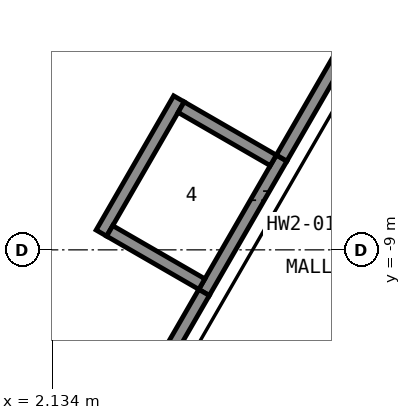
"""IFC4 building model, lengths in metres.
Left out: names, types, materials, properties, quantities, classifications, styles, units other than length and angle.
Written with IfcOpenShell. Run it as: python <this file> out.ifc"""

import sys

from ifc_helpers import new_model, si_unit, direction, frame, frame_2d, origin, place, context, subcontext, project, spatial, rectangle, extrude, element, save


model = new_model("IFC4")
c1 = context("Model", 3, precision=1e-05, world=origin(), true_north=direction((0.0, 1.0)))
c2 = subcontext(c1, "Body", "Model", "MODEL_VIEW")
j1 = project(units=[si_unit("LENGTHUNIT", "METRE"), si_unit("PLANEANGLEUNIT", "RADIAN")], contexts=[c1])
p1 = place(None, origin())
s1 = spatial("IfcSite", under=j1, at=p1, CompositionType="ELEMENT")
p2 = place(p1, origin())
s2 = spatial("IfcBuilding", under=s1, at=p2, CompositionType="ELEMENT")
p3 = place(p2, frame((0.0, 0.0, 32.0)))
s3 = spatial("IfcBuildingStorey", under=s2, at=p3, CompositionType="ELEMENT", Elevation=32.0)
p4 = place(p3, frame((4.63, -9.7, 0.0), z_axis=(0.0, 0.0, 1.0), x_axis=(0.500062241894, 0.865989465428, 0.0)))
e1 = element("IfcWall", 1, at=p4, inside=s3, PredefinedType="PARTITIONING", context=c2, shape_type="SweptSolid", body=[
    extrude(rectangle(XDim=2.55, YDim=0.2, at=frame_2d((1.275, 0.0))), origin(), (0.0, 0.0, 1.0), 4.8),
])
p5 = place(p3, frame((2.942, -8.725, 0.0), z_axis=(0.0, 0.0, 1.0), x_axis=(0.500020783669, 0.866013403995, 0.0)))
e2 = element("IfcWall", 2, at=p5, inside=s3, PredefinedType="PARTITIONING", context=c2, shape_type="SweptSolid", body=[
    extrude(rectangle(XDim=2.55, YDim=0.2, at=frame_2d((1.275, 0.0))), origin(), (0.0, 0.0, 1.0), 4.8),
])
p6 = place(p3, frame((5.769, -7.528, 0.0), z_axis=(0.0, 0.0, 1.0), x_axis=(-0.866002029911, 0.500040482552, 0.0)))
e3 = element("IfcWall", 3, at=p6, inside=s3, PredefinedType="PARTITIONING", context=c2, shape_type="SweptSolid", body=[
    extrude(rectangle(XDim=1.75, YDim=0.2, at=frame_2d((0.875, 0.0))), origin(), (0.0, 0.0, 1.0), 4.8),
])
p7 = place(p3, frame((4.594, -9.563, 0.0), z_axis=(0.0, 0.0, 1.0), x_axis=(-0.866036909293, 0.499980071345, 0.0)))
e4 = element("IfcWall", 4, at=p7, inside=s3, PredefinedType="PARTITIONING", context=c2, shape_type="SweptSolid", body=[
    extrude(rectangle(XDim=1.75, YDim=0.2, at=frame_2d((0.875, 0.0))), origin(), (0.0, 0.0, 1.0), 4.8),
])
p8 = place(p3, frame((1.677, -14.815, 0.0), z_axis=(0.0, 0.0, 1.0), x_axis=(0.49999445743, 0.866028603765, 0.0)))
e5 = element("IfcWall", 5, at=p8, inside=s3, PredefinedType="PARTITIONING", context=c2, shape_type="SweptSolid", body=[
    extrude(rectangle(XDim=5.905, YDim=0.2, at=frame_2d((2.952, 0.0))), origin(), (0.0, 0.0, 1.0), 4.55),
])
p9 = place(p3, frame((5.906, -7.49, 0.0), z_axis=(0.0, 0.0, 1.0), x_axis=(0.500252727967, 0.865879442048, 0.0)))
e6 = element("IfcWall", 6, at=p9, inside=s3, PredefinedType="PARTITIONING", context=c2, shape_type="SweptSolid", body=[
    extrude(rectangle(XDim=2.617, YDim=0.2, at=frame_2d((1.309, 0.0))), origin(), (0.0, 0.0, 1.0), 4.55),
])
p10 = place(p3, frame((19.586, 6.184, 0.0), z_axis=(0.0, 0.0, 1.0), x_axis=(-0.499994028088, -0.866028851642, 0.0)))
e7 = element("IfcWall", 7, at=p10, inside=s3, PredefinedType="PARTITIONING", context=c2, shape_type="SweptSolid", body=[
    extrude(rectangle(XDim=30.297, YDim=0.125, at=frame_2d((15.148, 0.0))), origin(), (0.0, 0.0, 1.0), 3.793),
])
p11 = place(p10, frame((26.385, 0.0, 0.0)))
e8 = element("IfcOpeningElement", 8, at=p11, cuts=e7, PredefinedType="OPENING", context=c2, shape_type="SweptSolid", body=[
    extrude(rectangle(XDim=1.0, YDim=2.1, at=frame_2d((0.5, 1.05))), frame((0.0, 0.073, 0.0), z_axis=(0.0, -1.0, 0.0), x_axis=(1.0, 0.0, 0.0)), (0.0, 0.0, 1.0), 0.145),
])
p12 = place(p10, frame((20.932, 0.0, 0.0)))
e9 = element("IfcOpeningElement", 9, at=p12, cuts=e7, PredefinedType="OPENING", context=c2, shape_type="SweptSolid", body=[
    extrude(rectangle(XDim=1.0, YDim=2.1, at=frame_2d((0.5, 1.05))), frame((0.0, 0.073, 0.0), z_axis=(0.0, -1.0, 0.0), x_axis=(1.0, 0.0, 0.0)), (0.0, 0.0, 1.0), 0.145),
])
p13 = place(p10, frame((16.741, 0.0, 0.0)))
e10 = element("IfcOpeningElement", 10, at=p13, cuts=e7, PredefinedType="OPENING", context=c2, shape_type="SweptSolid", body=[
    extrude(rectangle(XDim=1.0, YDim=2.1, at=frame_2d((0.5, 1.05))), frame((0.0, 0.073, 0.0), z_axis=(0.0, -1.0, 0.0), x_axis=(1.0, 0.0, 0.0)), (0.0, 0.0, 1.0), 0.145),
])
p14 = place(p10, frame((10.449, 0.0, 0.0)))
e11 = element("IfcOpeningElement", 11, at=p14, cuts=e7, PredefinedType="OPENING", context=c2, shape_type="SweptSolid", body=[
    extrude(rectangle(XDim=1.0, YDim=2.1, at=frame_2d((0.5, 1.05))), frame((0.0, 0.073, 0.0), z_axis=(0.0, -1.0, 0.0), x_axis=(1.0, 0.0, 0.0)), (0.0, 0.0, 1.0), 0.145),
])
p15 = place(p10, frame((2.916, 0.0, 0.0)))
e12 = element("IfcOpeningElement", 12, at=p15, cuts=e7, PredefinedType="OPENING", context=c2, shape_type="SweptSolid", body=[
    extrude(rectangle(XDim=1.0, YDim=2.1, at=frame_2d((0.5, 1.05))), frame((0.0, 0.073, 0.0), z_axis=(0.0, -1.0, 0.0), x_axis=(1.0, 0.0, 0.0)), (0.0, 0.0, 1.0), 0.145),
])
save(model, sys.argv[1])
